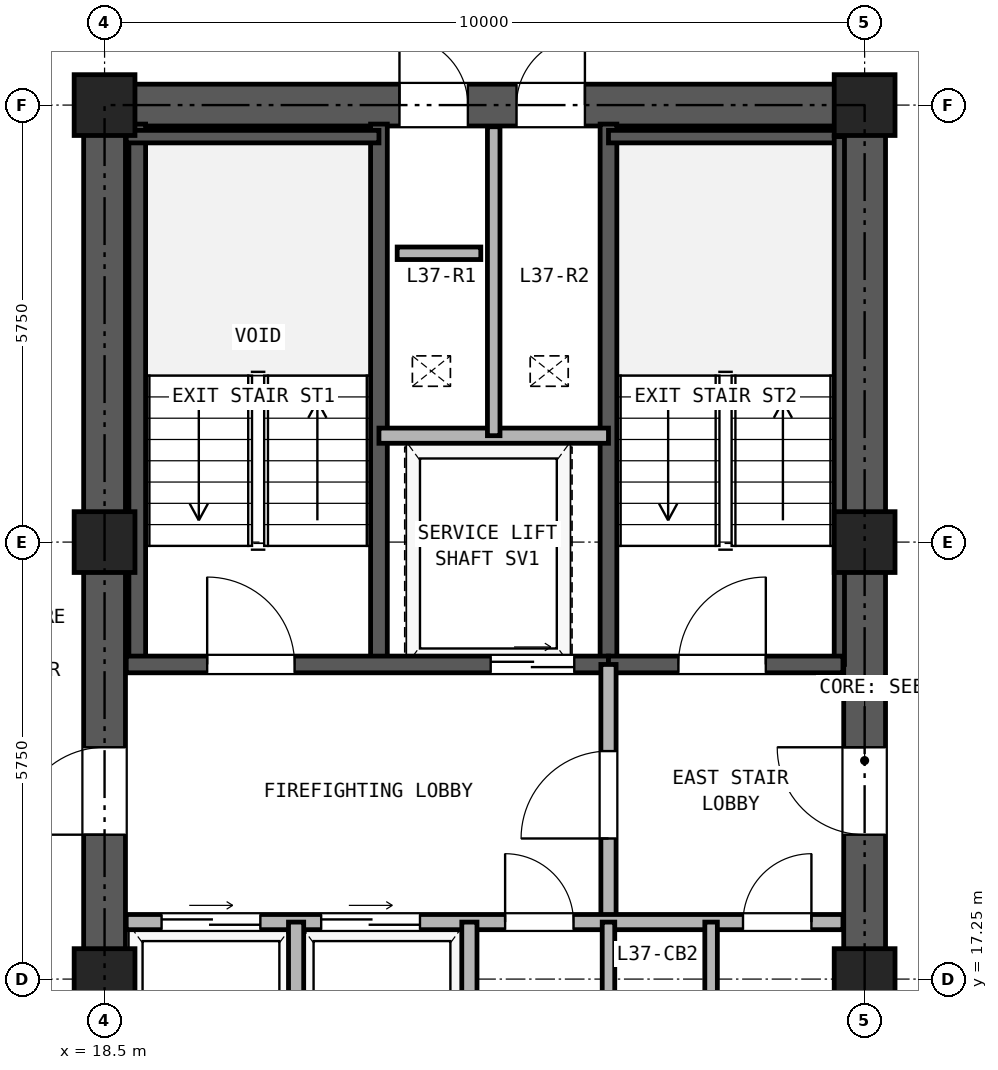
"""IFC4 building model, lengths in metres.
Left out: names, types, materials, properties, quantities, classifications, styles, units other than length and angle.
Written with IfcOpenShell. Run it as: python <this file> out.ifc"""

import sys

from ifc_helpers import new_model, si_unit, direction, frame, frame_2d, origin, origin_2d, place, context, subcontext, project, spatial, rectangle, hollow_rectangle, extrude, source, transform, mapped, element, fill, save


model = new_model("IFC4")
c1 = context("Model", 3, precision=1e-05, world=origin(), true_north=direction((0.0, 1.0)))
c2 = subcontext(c1, "Body", "Model", "MODEL_VIEW")
j1 = project(units=[si_unit("LENGTHUNIT", "METRE"), si_unit("PLANEANGLEUNIT", "RADIAN")], contexts=[c1])
p1 = place(None, origin())
s1 = spatial("IfcSite", under=j1, at=p1, CompositionType="ELEMENT")
p2 = place(p1, origin())
s2 = spatial("IfcBuilding", under=s1, at=p2, CompositionType="ELEMENT")
p3 = place(p2, frame((0.0, 0.0, 134.3)))
s3 = spatial("IfcBuildingStorey", under=s2, at=p3, CompositionType="ELEMENT", Elevation=134.3)
m1 = source(origin(), c2, "Body", "SweptSolid", [
    extrude(hollow_rectangle(XDim=0.8, YDim=0.8, WallThickness=0.045, at=origin_2d()), origin(), (0.0, 0.0, 1.0), 2.95),
])
for number, where, z_axis, x_axis in (
    (1, (18.5, 17.25, 0.0), (0.0, 0.0, 1.0), (1.0, 0.0, 0.0)),
    (2, (18.5, 23.0, 0.0), (0.0, 0.0, 1.0), (1.0, 0.0, 0.0)),
    (3, (18.5, 28.75, 0.0), (0.0, 0.0, 1.0), (1.0, 0.0, 0.0)),
    (4, (28.5, 17.25, 0.0), (0.0, 0.0, 1.0), (1.0, 0.0, 0.0)),
    (5, (28.5, 23.0, 0.0), (0.0, 0.0, 1.0), (1.0, 0.0, 0.0)),
    (6, (28.5, 28.75, 0.0), (0.0, 0.0, 1.0), (1.0, 0.0, 0.0)),
):
    element("IfcColumn", number, at=place(p3, frame(where, z_axis=z_axis, x_axis=x_axis)), inside=s3, PredefinedType="COLUMN", context=c2, shape_type="MappedRepresentation", body=[
        mapped(m1, transform((0.0, 0.0, 0.0), x_axis=(1.0, 0.0, 0.0), y_axis=(0.0, 1.0, 0.0), z_axis=(0.0, 0.0, 1.0), scale=1.0)),
    ])
p4 = place(p3, frame((18.225, 28.75, 0.0), z_axis=(0.0, 0.0, 1.0), x_axis=(1.0, 0.0, 0.0)))
e7 = element("IfcWall", 7, at=p4, inside=s3, PredefinedType="SHEAR", context=c2, shape_type="SweptSolid", body=[
    extrude(rectangle(XDim=10.55, YDim=0.55, at=frame_2d((5.275, 0.0))), origin(), (0.0, 0.0, 1.0), 2.95),
])
p5 = place(p4, frame((4.155, 0.0, 0.0)))
e8 = element("IfcOpeningElement", 8, at=p5, cuts=e7, PredefinedType="OPENING", context=c2, shape_type="SweptSolid", body=[
    extrude(rectangle(XDim=0.9, YDim=2.05, at=frame_2d((0.45, 1.025))), frame((0.0, 0.285, 0.0), z_axis=(0.0, -1.0, 0.0), x_axis=(1.0, 0.0, 0.0)), (0.0, 0.0, 1.0), 0.57),
])
p6 = place(p4, frame((5.695, 0.0, 0.0)))
e9 = element("IfcOpeningElement", 9, at=p6, cuts=e7, PredefinedType="OPENING", context=c2, shape_type="SweptSolid", body=[
    extrude(rectangle(XDim=0.9, YDim=2.05, at=frame_2d((0.45, 1.025))), frame((0.0, 0.285, 0.0), z_axis=(0.0, -1.0, 0.0), x_axis=(1.0, 0.0, 0.0)), (0.0, 0.0, 1.0), 0.57),
])
p7 = place(p3, frame((18.5, 11.775, 0.0), z_axis=(0.0, 0.0, 1.0), x_axis=(0.0, 1.0, 0.0)))
e10 = element("IfcWall", 10, at=p7, inside=s3, PredefinedType="SHEAR", context=c2, shape_type="SweptSolid", body=[
    extrude(rectangle(XDim=16.7, YDim=0.55, at=frame_2d((8.35, 0.0))), origin(), (0.0, 0.0, 1.0), 2.95),
])
p8 = place(p7, frame((7.375, 0.0, 0.0)))
e11 = element("IfcOpeningElement", 11, at=p8, cuts=e10, PredefinedType="OPENING", context=c2, shape_type="SweptSolid", body=[
    extrude(rectangle(XDim=1.15, YDim=2.2, at=frame_2d((0.575, 1.1))), frame((0.0, 0.285, 0.0), z_axis=(0.0, -1.0, 0.0), x_axis=(1.0, 0.0, 0.0)), (0.0, 0.0, 1.0), 0.57),
])
p9 = place(p3, frame((28.5, 11.775, 0.0), z_axis=(0.0, 0.0, 1.0), x_axis=(0.0, 1.0, 0.0)))
e12 = element("IfcWall", 12, at=p9, inside=s3, PredefinedType="SHEAR", context=c2, shape_type="SweptSolid", body=[
    extrude(rectangle(XDim=16.7, YDim=0.55, at=frame_2d((8.35, 0.0))), origin(), (0.0, 0.0, 1.0), 2.95),
])
p10 = place(p9, frame((7.375, 0.0, 0.0)))
e13 = element("IfcOpeningElement", 13, at=p10, cuts=e12, PredefinedType="OPENING", context=c2, shape_type="SweptSolid", body=[
    extrude(rectangle(XDim=1.15, YDim=2.2, at=frame_2d((0.575, 1.1))), frame((0.0, 0.285, 0.0), z_axis=(0.0, -1.0, 0.0), x_axis=(1.0, 0.0, 0.0)), (0.0, 0.0, 1.0), 0.57),
])
for number, where, z_axis, x_axis in (
    (14, (18.93, 21.39, 0.0), (0.0, 0.0, 1.0), (0.0, 1.0, 0.0)),
    (15, (22.11, 21.39, 0.0), (0.0, 0.0, 1.0), (0.0, 1.0, 0.0)),
    (16, (25.13, 21.39, 0.0), (0.0, 0.0, 1.0), (0.0, 1.0, 0.0)),
):
    element("IfcWall", number, at=place(p3, frame(where, z_axis=z_axis, x_axis=x_axis)), inside=s3, PredefinedType="SOLIDWALL", context=c2, shape_type="SweptSolid", body=[
        extrude(rectangle(XDim=7.11, YDim=0.22, at=frame_2d((3.555, 0.0))), origin(), (0.0, 0.0, 1.0), 2.95),
    ])
p11 = place(p3, frame((18.785, 28.335, 0.0), z_axis=(0.0, 0.0, 1.0), x_axis=(1.0, 0.0, 0.0)))
e17 = element("IfcWall", 17, at=p11, inside=s3, PredefinedType="PARTITIONING", context=c2, shape_type="SweptSolid", body=[
    extrude(rectangle(XDim=3.325, YDim=0.165, at=frame_2d((1.663, 0.0))), origin(), (0.0, 0.0, 1.0), 2.95),
])
p12 = place(p3, frame((25.13, 28.335, 0.0), z_axis=(0.0, 0.0, 1.0), x_axis=(1.0, 0.0, 0.0)))
e18 = element("IfcWall", 18, at=p12, inside=s3, PredefinedType="PARTITIONING", context=c2, shape_type="SweptSolid", body=[
    extrude(rectangle(XDim=3.085, YDim=0.165, at=frame_2d((1.542, 0.0))), origin(), (0.0, 0.0, 1.0), 2.95),
])
p13 = place(p3, frame((28.167, 21.39, 0.0), z_axis=(0.0, 0.0, 1.0), x_axis=(0.0, 1.0, 0.0)))
e19 = element("IfcWall", 19, at=p13, inside=s3, PredefinedType="PARTITIONING", context=c2, shape_type="SweptSolid", body=[
    extrude(rectangle(XDim=6.945, YDim=0.135, at=frame_2d((3.473, 0.0))), origin(), (0.0, 0.0, 1.0), 2.95),
])
p14 = place(p3, frame((18.785, 21.39, 0.0), z_axis=(0.0, 0.0, 1.0), x_axis=(1.0, 0.0, 0.0)))
e20 = element("IfcWall", 20, at=p14, inside=s3, PredefinedType="SOLIDWALL", context=c2, shape_type="SweptSolid", body=[
    extrude(rectangle(XDim=6.345, YDim=0.22, at=frame_2d((3.172, 0.0))), origin(), (0.0, 0.0, 1.0), 2.95),
])
p15 = place(p14, frame((1.065, 0.0, 0.0)))
e21 = element("IfcOpeningElement", 21, at=p15, cuts=e20, PredefinedType="OPENING", context=c2, shape_type="SweptSolid", body=[
    extrude(rectangle(XDim=1.15, YDim=2.2, at=frame_2d((0.575, 1.1))), frame((0.0, 0.12, 0.0), z_axis=(0.0, -1.0, 0.0), x_axis=(1.0, 0.0, 0.0)), (0.0, 0.0, 1.0), 0.24),
])
p16 = place(p14, frame((4.795, 0.0, 0.0)))
e22 = element("IfcOpeningElement", 22, at=p16, cuts=e20, PredefinedType="OPENING", context=c2, shape_type="SweptSolid", body=[
    extrude(rectangle(XDim=1.1, YDim=2.25, at=frame_2d((0.55, 1.125))), frame((0.0, 0.12, 0.0), z_axis=(0.0, -1.0, 0.0), x_axis=(1.0, 0.0, 0.0)), (0.0, 0.0, 1.0), 0.24),
])
p17 = place(p3, frame((25.13, 21.39, 0.0), z_axis=(0.0, 0.0, 1.0), x_axis=(1.0, 0.0, 0.0)))
e23 = element("IfcWall", 23, at=p17, inside=s3, PredefinedType="SOLIDWALL", context=c2, shape_type="SweptSolid", body=[
    extrude(rectangle(XDim=3.085, YDim=0.22, at=frame_2d((1.542, 0.0))), origin(), (0.0, 0.0, 1.0), 2.95),
])
p18 = place(p17, frame((0.92, 0.0, 0.0)))
e24 = element("IfcOpeningElement", 24, at=p18, cuts=e23, PredefinedType="OPENING", context=c2, shape_type="SweptSolid", body=[
    extrude(rectangle(XDim=1.15, YDim=2.2, at=frame_2d((0.575, 1.1))), frame((0.0, 0.12, 0.0), z_axis=(0.0, -1.0, 0.0), x_axis=(1.0, 0.0, 0.0)), (0.0, 0.0, 1.0), 0.24),
])
p19 = place(p3, frame((22.11, 24.4, 0.0), z_axis=(0.0, 0.0, 1.0), x_axis=(1.0, 0.0, 0.0)))
e25 = element("IfcWall", 25, at=p19, inside=s3, PredefinedType="PARTITIONING", context=c2, shape_type="SweptSolid", body=[
    extrude(rectangle(XDim=3.02, YDim=0.2, at=frame_2d((1.51, 0.0))), origin(), (0.0, 0.0, 1.0), 2.95),
])
p20 = place(p3, frame((23.62, 24.4, 0.0), z_axis=(0.0, 0.0, 1.0), x_axis=(0.0, 1.0, 0.0)))
e26 = element("IfcWall", 26, at=p20, inside=s3, PredefinedType="PARTITIONING", context=c2, shape_type="SweptSolid", body=[
    extrude(rectangle(XDim=4.065, YDim=0.165, at=frame_2d((2.033, 0.0))), origin(), (0.0, 0.0, 1.0), 2.95),
])
p21 = place(p3, frame((25.13, 18.0, 0.0), z_axis=(0.0, 0.0, 1.0), x_axis=(0.0, 1.0, 0.0)))
e27 = element("IfcWall", 27, at=p21, inside=s3, PredefinedType="PARTITIONING", context=c2, shape_type="SweptSolid", body=[
    extrude(rectangle(XDim=3.39, YDim=0.2, at=frame_2d((1.695, 0.0))), origin(), (0.0, 0.0, 1.0), 2.95),
])
p22 = place(p21, frame((1.1, 0.0, 0.0)))
e28 = element("IfcOpeningElement", 28, at=p22, cuts=e27, PredefinedType="OPENING", context=c2, shape_type="SweptSolid", body=[
    extrude(rectangle(XDim=1.15, YDim=2.2, at=frame_2d((0.575, 1.1))), frame((0.0, 0.11, 0.0), z_axis=(0.0, -1.0, 0.0), x_axis=(1.0, 0.0, 0.0)), (0.0, 0.0, 1.0), 0.22),
])
p23 = place(p3, frame((18.785, 18.0, 0.0), z_axis=(0.0, 0.0, 1.0), x_axis=(1.0, 0.0, 0.0)))
e29 = element("IfcWall", 29, at=p23, inside=s3, PredefinedType="PARTITIONING", context=c2, shape_type="SweptSolid", body=[
    extrude(rectangle(XDim=9.43, YDim=0.2, at=frame_2d((4.715, 0.0))), origin(), (0.0, 0.0, 1.0), 2.95),
])
p24 = place(p23, frame((0.465, 0.0, 0.0)))
e30 = element("IfcOpeningElement", 30, at=p24, cuts=e29, PredefinedType="OPENING", context=c2, shape_type="SweptSolid", body=[
    extrude(rectangle(XDim=1.3, YDim=2.3, at=frame_2d((0.65, 1.15))), frame((0.0, 0.11, 0.0), z_axis=(0.0, -1.0, 0.0), x_axis=(1.0, 0.0, 0.0)), (0.0, 0.0, 1.0), 0.22),
])
p25 = place(p23, frame((2.565, 0.0, 0.0)))
e31 = element("IfcOpeningElement", 31, at=p25, cuts=e29, PredefinedType="OPENING", context=c2, shape_type="SweptSolid", body=[
    extrude(rectangle(XDim=1.3, YDim=2.3, at=frame_2d((0.65, 1.15))), frame((0.0, 0.11, 0.0), z_axis=(0.0, -1.0, 0.0), x_axis=(1.0, 0.0, 0.0)), (0.0, 0.0, 1.0), 0.22),
])
p26 = place(p23, frame((4.985, 0.0, 0.0)))
e32 = element("IfcOpeningElement", 32, at=p26, cuts=e29, PredefinedType="OPENING", context=c2, shape_type="SweptSolid", body=[
    extrude(rectangle(XDim=0.9, YDim=2.05, at=frame_2d((0.45, 1.025))), frame((0.0, 0.11, 0.0), z_axis=(0.0, -1.0, 0.0), x_axis=(1.0, 0.0, 0.0)), (0.0, 0.0, 1.0), 0.22),
])
p27 = place(p23, frame((8.115, 0.0, 0.0)))
e33 = element("IfcOpeningElement", 33, at=p27, cuts=e29, PredefinedType="OPENING", context=c2, shape_type="SweptSolid", body=[
    extrude(rectangle(XDim=0.9, YDim=2.05, at=frame_2d((0.45, 1.025))), frame((0.0, 0.11, 0.0), z_axis=(0.0, -1.0, 0.0), x_axis=(1.0, 0.0, 0.0)), (0.0, 0.0, 1.0), 0.22),
])
for number, where, z_axis, x_axis in (
    (34, (21.02, 15.0, 0.0), (0.0, 0.0, 1.0), (0.0, 1.0, 0.0)),
    (35, (23.3, 15.0, 0.0), (0.0, 0.0, 1.0), (0.0, 1.0, 0.0)),
):
    element("IfcWall", number, at=place(p3, frame(where, z_axis=z_axis, x_axis=x_axis)), inside=s3, PredefinedType="PARTITIONING", context=c2, shape_type="SweptSolid", body=[
        extrude(rectangle(XDim=3.0, YDim=0.2, at=frame_2d((1.5, 0.0))), origin(), (0.0, 0.0, 1.0), 2.95),
    ])
p28 = place(p3, frame((25.13, 15.0, 0.0), z_axis=(0.0, 0.0, 1.0), x_axis=(0.0, 1.0, 0.0)))
e36 = element("IfcWall", 36, at=p28, inside=s3, PredefinedType="PARTITIONING", context=c2, shape_type="SweptSolid", body=[
    extrude(rectangle(XDim=3.0, YDim=0.165, at=frame_2d((1.5, 0.0))), origin(), (0.0, 0.0, 1.0), 2.95),
])
p29 = place(p3, frame((26.48, 15.0, 0.0), z_axis=(0.0, 0.0, 1.0), x_axis=(0.0, 1.0, 0.0)))
e37 = element("IfcWall", 37, at=p29, inside=s3, PredefinedType="PARTITIONING", context=c2, shape_type="SweptSolid", body=[
    extrude(rectangle(XDim=3.0, YDim=0.165, at=frame_2d((1.5, 0.0))), origin(), (0.0, 0.0, 1.0), 2.95),
])
p30 = place(p29, frame((1.05, 0.0, 0.0)))
e38 = element("IfcOpeningElement", 38, at=p30, cuts=e37, PredefinedType="OPENING", context=c2, shape_type="SweptSolid", body=[
    extrude(rectangle(XDim=0.9, YDim=2.05, at=frame_2d((0.45, 1.025))), frame((0.0, 0.093, 0.0), z_axis=(0.0, -1.0, 0.0), x_axis=(1.0, 0.0, 0.0)), (0.0, 0.0, 1.0), 0.185),
])
p31 = place(p3, frame((22.35, 26.8, 0.0), z_axis=(0.0, 0.0, 1.0), x_axis=(1.0, 0.0, 0.0)))
e39 = element("IfcWall", 39, at=p31, inside=s3, PredefinedType="PARTITIONING", context=c2, shape_type="SweptSolid", body=[
    extrude(rectangle(XDim=1.1, YDim=0.165, at=frame_2d((0.55, 0.0))), origin(), (0.0, 0.0, 1.0), 2.95),
])
p32 = place(p15, frame((1.15, 0.0, 0.0), z_axis=(0.0, 0.0, 1.0), x_axis=(-1.0, 0.0, 0.0)))
e40 = element("IfcDoor", 40, at=p32, inside=s3, OperationType="SINGLE_SWING_LEFT", PredefinedType="DOOR", context=c2, shape_type="SweptSolid", body=[
    extrude(rectangle(XDim=1.15, YDim=2.2, at=frame_2d((0.575, 1.1))), frame((0.0, 0.025, 0.0), z_axis=(0.0, -1.0, 0.0), x_axis=(1.0, 0.0, 0.0)), (0.0, 0.0, 1.0), 0.05),
])
fill(e21, e40)
p33 = place(p18, frame((1.15, 0.0, 0.0), z_axis=(0.0, 0.0, 1.0), x_axis=(-1.0, 0.0, 0.0)))
e41 = element("IfcDoor", 41, at=p33, inside=s3, OperationType="SINGLE_SWING_RIGHT", PredefinedType="DOOR", context=c2, shape_type="SweptSolid", body=[
    extrude(rectangle(XDim=1.15, YDim=2.2, at=frame_2d((0.575, 1.1))), frame((0.0, 0.025, 0.0), z_axis=(0.0, -1.0, 0.0), x_axis=(1.0, 0.0, 0.0)), (0.0, 0.0, 1.0), 0.05),
])
fill(e24, e41)
p34 = place(p16, frame((1.1, 0.0, 0.0), z_axis=(0.0, 0.0, 1.0), x_axis=(-1.0, 0.0, 0.0)))
e42 = element("IfcDoor", 42, at=p34, inside=s3, OperationType="DOUBLE_DOOR_SLIDING", PredefinedType="DOOR", context=c2, shape_type="SweptSolid", body=[
    extrude(rectangle(XDim=1.1, YDim=2.25, at=frame_2d((0.55, 1.125))), frame((0.0, 0.025, 0.0), z_axis=(0.0, -1.0, 0.0), x_axis=(1.0, 0.0, 0.0)), (0.0, 0.0, 1.0), 0.05),
])
fill(e22, e42)
p35 = place(p22, origin())
e43 = element("IfcDoor", 43, at=p35, inside=s3, OperationType="SINGLE_SWING_LEFT", PredefinedType="DOOR", context=c2, shape_type="SweptSolid", body=[
    extrude(rectangle(XDim=1.15, YDim=2.2, at=frame_2d((0.575, 1.1))), frame((0.0, 0.025, 0.0), z_axis=(0.0, -1.0, 0.0), x_axis=(1.0, 0.0, 0.0)), (0.0, 0.0, 1.0), 0.05),
])
fill(e28, e43)
p36 = place(p24, origin())
e44 = element("IfcDoor", 44, at=p36, inside=s3, OperationType="DOUBLE_DOOR_SLIDING", PredefinedType="DOOR", context=c2, shape_type="SweptSolid", body=[
    extrude(rectangle(XDim=1.3, YDim=2.3, at=frame_2d((0.65, 1.15))), frame((0.0, 0.025, 0.0), z_axis=(0.0, -1.0, 0.0), x_axis=(1.0, 0.0, 0.0)), (0.0, 0.0, 1.0), 0.05),
])
fill(e30, e44)
p37 = place(p25, origin())
e45 = element("IfcDoor", 45, at=p37, inside=s3, OperationType="DOUBLE_DOOR_SLIDING", PredefinedType="DOOR", context=c2, shape_type="SweptSolid", body=[
    extrude(rectangle(XDim=1.3, YDim=2.3, at=frame_2d((0.65, 1.15))), frame((0.0, 0.025, 0.0), z_axis=(0.0, -1.0, 0.0), x_axis=(1.0, 0.0, 0.0)), (0.0, 0.0, 1.0), 0.05),
])
fill(e31, e45)
p38 = place(p26, frame((0.9, 0.0, 0.0), z_axis=(0.0, 0.0, 1.0), x_axis=(-1.0, 0.0, 0.0)))
e46 = element("IfcDoor", 46, at=p38, inside=s3, OperationType="SINGLE_SWING_LEFT", PredefinedType="DOOR", context=c2, shape_type="SweptSolid", body=[
    extrude(rectangle(XDim=0.9, YDim=2.05, at=frame_2d((0.45, 1.025))), frame((0.0, 0.025, 0.0), z_axis=(0.0, -1.0, 0.0), x_axis=(1.0, 0.0, 0.0)), (0.0, 0.0, 1.0), 0.05),
])
fill(e32, e46)
p39 = place(p27, frame((0.9, 0.0, 0.0), z_axis=(0.0, 0.0, 1.0), x_axis=(-1.0, 0.0, 0.0)))
e47 = element("IfcDoor", 47, at=p39, inside=s3, OperationType="SINGLE_SWING_RIGHT", PredefinedType="DOOR", context=c2, shape_type="SweptSolid", body=[
    extrude(rectangle(XDim=0.9, YDim=2.05, at=frame_2d((0.45, 1.025))), frame((0.0, 0.025, 0.0), z_axis=(0.0, -1.0, 0.0), x_axis=(1.0, 0.0, 0.0)), (0.0, 0.0, 1.0), 0.05),
])
fill(e33, e47)
p40 = place(p8, frame((1.15, 0.0, 0.0), z_axis=(0.0, 0.0, 1.0), x_axis=(-1.0, 0.0, 0.0)))
e48 = element("IfcDoor", 48, at=p40, inside=s3, OperationType="SINGLE_SWING_LEFT", PredefinedType="DOOR", context=c2, shape_type="SweptSolid", body=[
    extrude(rectangle(XDim=1.15, YDim=2.2, at=frame_2d((0.575, 1.1))), frame((0.0, 0.025, 0.0), z_axis=(0.0, -1.0, 0.0), x_axis=(1.0, 0.0, 0.0)), (0.0, 0.0, 1.0), 0.05),
])
fill(e11, e48)
p41 = place(p10, origin())
e49 = element("IfcDoor", 49, at=p41, inside=s3, OperationType="SINGLE_SWING_RIGHT", PredefinedType="DOOR", context=c2, shape_type="SweptSolid", body=[
    extrude(rectangle(XDim=1.15, YDim=2.2, at=frame_2d((0.575, 1.1))), frame((0.0, 0.025, 0.0), z_axis=(0.0, -1.0, 0.0), x_axis=(1.0, 0.0, 0.0)), (0.0, 0.0, 1.0), 0.05),
])
fill(e13, e49)
p42 = place(p5, origin())
e50 = element("IfcDoor", 50, at=p42, inside=s3, OperationType="SINGLE_SWING_LEFT", PredefinedType="DOOR", context=c2, shape_type="SweptSolid", body=[
    extrude(rectangle(XDim=0.9, YDim=2.05, at=frame_2d((0.45, 1.025))), frame((0.0, 0.025, 0.0), z_axis=(0.0, -1.0, 0.0), x_axis=(1.0, 0.0, 0.0)), (0.0, 0.0, 1.0), 0.05),
])
fill(e8, e50)
p43 = place(p6, origin())
e51 = element("IfcDoor", 51, at=p43, inside=s3, OperationType="SINGLE_SWING_RIGHT", PredefinedType="DOOR", context=c2, shape_type="SweptSolid", body=[
    extrude(rectangle(XDim=0.9, YDim=2.05, at=frame_2d((0.45, 1.025))), frame((0.0, 0.025, 0.0), z_axis=(0.0, -1.0, 0.0), x_axis=(1.0, 0.0, 0.0)), (0.0, 0.0, 1.0), 0.05),
])
fill(e9, e51)
save(model, sys.argv[1])
